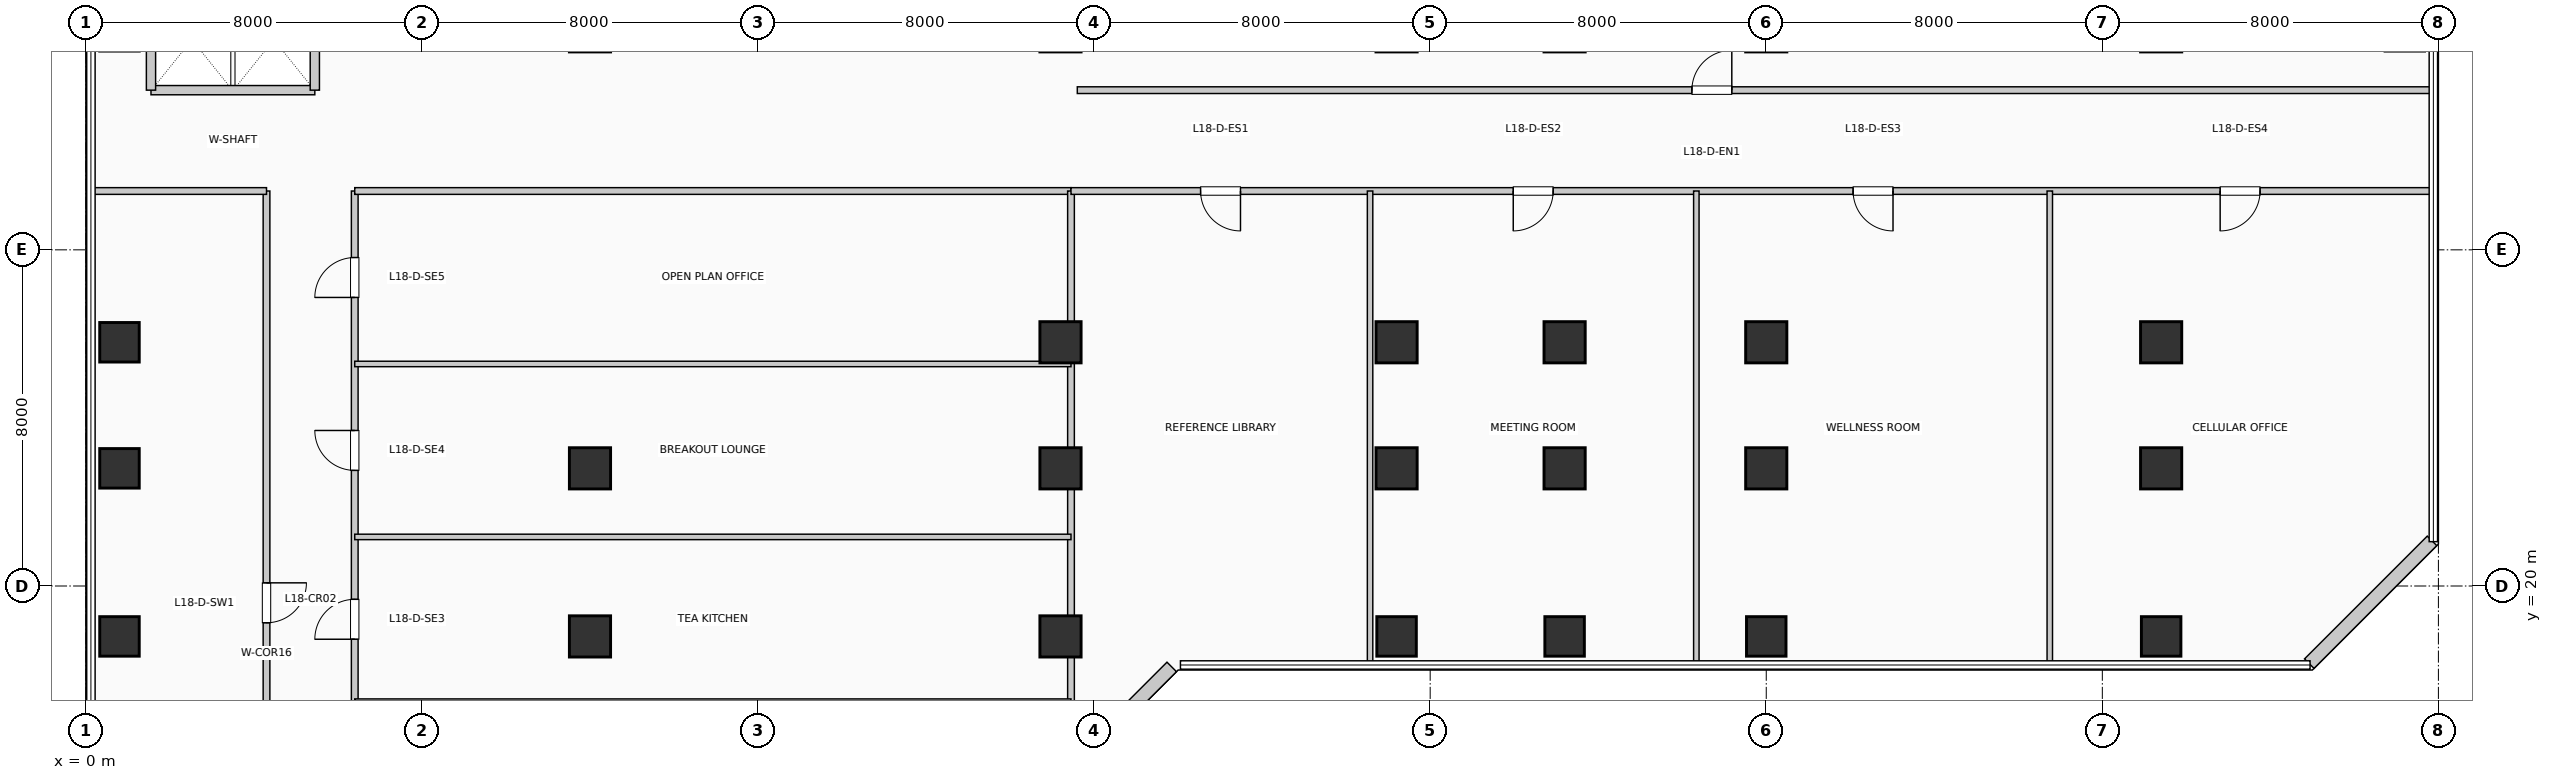
"""IFC4 building model, lengths in metres.
Left out: names, types, materials, properties, quantities, classifications, styles, units other than length and angle.
Written with IfcOpenShell. Run it as: python <this file> out.ifc"""

import sys

from ifc_helpers import new_model, si_unit, direction, frame, frame_2d, origin, origin_2d, place, context, subcontext, project, spatial, rectangle, extrude, element, fill, save


model = new_model("IFC4")
c1 = context("Model", 3, precision=1e-05, world=origin(), true_north=direction((0.0, 1.0)))
c2 = subcontext(c1, "Body", "Model", "MODEL_VIEW")
j1 = project(units=[si_unit("LENGTHUNIT", "METRE"), si_unit("PLANEANGLEUNIT", "RADIAN")], contexts=[c1])
p1 = place(None, origin())
s1 = spatial("IfcSite", under=j1, at=p1, CompositionType="ELEMENT")
p2 = place(p1, origin())
s2 = spatial("IfcBuilding", under=s1, at=p2, CompositionType="ELEMENT")
p3 = place(p2, frame((0.0, 0.0, 77.88)))
s3 = spatial("IfcBuildingStorey", under=s2, at=p3, CompositionType="ELEMENT", Elevation=77.88)
for number, where, z_axis, x_axis in (
    (1, (0.8, 18.8, 0.0), (0.0, 0.0, 1.0), (1.0, 0.0, 0.0)),
    (2, (0.8, 22.8, 0.0), (0.0, 0.0, 1.0), (1.0, 0.0, 0.0)),
    (3, (0.8, 25.8, 0.0), (0.0, 0.0, 1.0), (1.0, 0.0, 0.0)),
):
    element("IfcColumn", number, at=place(p3, frame(where, z_axis=z_axis, x_axis=x_axis)), inside=s3, PredefinedType="COLUMN", context=c2, shape_type="SweptSolid", body=[
        extrude(rectangle(XDim=0.94, YDim=0.94, at=origin_2d()), origin(), (0.0, 0.0, 1.0), 3.96),
    ])
for number, where, z_axis, x_axis in (
    (4, (12.0, 18.8, 0.0), (0.0, 0.0, 1.0), (1.0, 0.0, 0.0)),
    (5, (12.0, 22.8, 0.0), (0.0, 0.0, 1.0), (1.0, 0.0, 0.0)),
    (6, (23.2, 18.8, 0.0), (0.0, 0.0, 1.0), (1.0, 0.0, 0.0)),
    (7, (23.2, 22.8, 0.0), (0.0, 0.0, 1.0), (1.0, 0.0, 0.0)),
    (8, (23.2, 25.8, 0.0), (0.0, 0.0, 1.0), (1.0, 0.0, 0.0)),
):
    element("IfcColumn", number, at=place(p3, frame(where, z_axis=z_axis, x_axis=x_axis)), inside=s3, PredefinedType="COLUMN", context=c2, shape_type="SweptSolid", body=[
        extrude(rectangle(XDim=0.98, YDim=0.98, at=origin_2d()), origin(), (0.0, 0.0, 1.0), 3.96),
    ])
p4 = place(p3, frame((31.2, 18.8, 0.0), z_axis=(0.0, 0.0, 1.0), x_axis=(1.0, 0.0, 0.0)))
e9 = element("IfcColumn", 9, at=p4, inside=s3, PredefinedType="COLUMN", context=c2, shape_type="SweptSolid", body=[
    extrude(rectangle(XDim=0.94, YDim=0.94, at=origin_2d()), origin(), (0.0, 0.0, 1.0), 3.96),
])
for number, where, z_axis, x_axis in (
    (10, (31.2, 22.8, 0.0), (0.0, 0.0, 1.0), (1.0, 0.0, 0.0)),
    (11, (31.2, 25.8, 0.0), (0.0, 0.0, 1.0), (1.0, 0.0, 0.0)),
):
    element("IfcColumn", number, at=place(p3, frame(where, z_axis=z_axis, x_axis=x_axis)), inside=s3, PredefinedType="COLUMN", context=c2, shape_type="SweptSolid", body=[
        extrude(rectangle(XDim=0.98, YDim=0.98, at=origin_2d()), origin(), (0.0, 0.0, 1.0), 3.96),
    ])
p5 = place(p3, frame((35.2, 18.8, 0.0), z_axis=(0.0, 0.0, 1.0), x_axis=(1.0, 0.0, 0.0)))
e12 = element("IfcColumn", 12, at=p5, inside=s3, PredefinedType="COLUMN", context=c2, shape_type="SweptSolid", body=[
    extrude(rectangle(XDim=0.94, YDim=0.94, at=origin_2d()), origin(), (0.0, 0.0, 1.0), 3.96),
])
for number, where, z_axis, x_axis in (
    (13, (35.2, 22.8, 0.0), (0.0, 0.0, 1.0), (1.0, 0.0, 0.0)),
    (14, (35.2, 25.8, 0.0), (0.0, 0.0, 1.0), (1.0, 0.0, 0.0)),
):
    element("IfcColumn", number, at=place(p3, frame(where, z_axis=z_axis, x_axis=x_axis)), inside=s3, PredefinedType="COLUMN", context=c2, shape_type="SweptSolid", body=[
        extrude(rectangle(XDim=0.98, YDim=0.98, at=origin_2d()), origin(), (0.0, 0.0, 1.0), 3.96),
    ])
p6 = place(p3, frame((40.0, 18.8, 0.0), z_axis=(0.0, 0.0, 1.0), x_axis=(1.0, 0.0, 0.0)))
e15 = element("IfcColumn", 15, at=p6, inside=s3, PredefinedType="COLUMN", context=c2, shape_type="SweptSolid", body=[
    extrude(rectangle(XDim=0.94, YDim=0.94, at=origin_2d()), origin(), (0.0, 0.0, 1.0), 3.96),
])
for number, where, z_axis, x_axis in (
    (16, (40.0, 22.8, 0.0), (0.0, 0.0, 1.0), (1.0, 0.0, 0.0)),
    (17, (40.0, 25.8, 0.0), (0.0, 0.0, 1.0), (1.0, 0.0, 0.0)),
):
    element("IfcColumn", number, at=place(p3, frame(where, z_axis=z_axis, x_axis=x_axis)), inside=s3, PredefinedType="COLUMN", context=c2, shape_type="SweptSolid", body=[
        extrude(rectangle(XDim=0.98, YDim=0.98, at=origin_2d()), origin(), (0.0, 0.0, 1.0), 3.96),
    ])
p7 = place(p3, frame((49.4, 18.8, 0.0), z_axis=(0.0, 0.0, 1.0), x_axis=(1.0, 0.0, 0.0)))
e18 = element("IfcColumn", 18, at=p7, inside=s3, PredefinedType="COLUMN", context=c2, shape_type="SweptSolid", body=[
    extrude(rectangle(XDim=0.94, YDim=0.94, at=origin_2d()), origin(), (0.0, 0.0, 1.0), 3.96),
])
for number, where, z_axis, x_axis in (
    (19, (49.4, 22.8, 0.0), (0.0, 0.0, 1.0), (1.0, 0.0, 0.0)),
    (20, (49.4, 25.8, 0.0), (0.0, 0.0, 1.0), (1.0, 0.0, 0.0)),
):
    element("IfcColumn", number, at=place(p3, frame(where, z_axis=z_axis, x_axis=x_axis)), inside=s3, PredefinedType="COLUMN", context=c2, shape_type="SweptSolid", body=[
        extrude(rectangle(XDim=0.98, YDim=0.98, at=origin_2d()), origin(), (0.0, 0.0, 1.0), 3.96),
    ])
p8 = place(p3, frame((23.926, 16.152, 0.0), z_axis=(0.0, 0.0, 1.0), x_axis=(0.707106781187, 0.707106781187, 0.0)))
e21 = element("IfcWall", 21, at=p8, inside=s3, PredefinedType="SOLIDWALL", context=c2, shape_type="SweptSolid", body=[
    extrude(rectangle(XDim=2.718, YDim=0.32, at=frame_2d((1.359, 0.0))), origin(), (0.0, 0.0, 1.0), 3.71),
])
p9 = place(p3, frame((52.926, 18.152, 0.0), z_axis=(0.0, 0.0, 1.0), x_axis=(0.707106781187, 0.707106781187, 0.0)))
e22 = element("IfcWall", 22, at=p9, inside=s3, PredefinedType="SOLIDWALL", context=c2, shape_type="SweptSolid", body=[
    extrude(rectangle(XDim=4.133, YDim=0.32, at=frame_2d((2.066, 0.0))), origin(), (0.0, 0.0, 1.0), 3.71),
])
p10 = place(p3, frame((1.55, 31.8, 0.0), z_axis=(0.0, 0.0, 1.0), x_axis=(1.0, 0.0, 0.0)))
e23 = element("IfcWall", 23, at=p10, inside=s3, PredefinedType="PARTITIONING", context=c2, shape_type="SweptSolid", body=[
    extrude(rectangle(XDim=3.9, YDim=0.22, at=frame_2d((1.95, 0.0))), origin(), (0.0, 0.0, 1.0), 3.71),
])
for number, where, z_axis, x_axis in (
    (24, (1.55, 31.8, 0.0), (0.0, 0.0, 1.0), (0.0, 1.0, 0.0)),
    (25, (5.45, 31.8, 0.0), (0.0, 0.0, 1.0), (0.0, 1.0, 0.0)),
):
    element("IfcWall", number, at=place(p3, frame(where, z_axis=z_axis, x_axis=x_axis)), inside=s3, PredefinedType="PARTITIONING", context=c2, shape_type="SweptSolid", body=[
        extrude(rectangle(XDim=2.38, YDim=0.22, at=frame_2d((1.19, 0.0))), origin(), (0.0, 0.0, 1.0), 3.71),
    ])
p11 = place(p3, frame((4.3, 9.8, 0.0), z_axis=(0.0, 0.0, 1.0), x_axis=(0.0, 1.0, 0.0)))
e26 = element("IfcWall", 26, at=p11, inside=s3, PredefinedType="PARTITIONING", context=c2, shape_type="SweptSolid", body=[
    extrude(rectangle(XDim=19.6, YDim=0.16, at=frame_2d((9.8, 0.0))), origin(), (0.0, 0.0, 1.0), 3.71),
])
p12 = place(p11, frame((10.275, 0.0, 0.0), z_axis=(0.0, 0.0, 1.0), x_axis=(-1.0, 0.0, 0.0)))
e27 = element("IfcOpeningElement", 27, at=p12, cuts=e26, PredefinedType="OPENING", context=c2, shape_type="SweptSolid", body=[
    extrude(rectangle(XDim=0.95, YDim=2.15, at=frame_2d((0.475, 1.075))), frame((0.0, 0.09, 0.0), z_axis=(0.0, -1.0, 0.0), x_axis=(1.0, 0.0, 0.0)), (0.0, 0.0, 1.0), 0.18),
])
p13 = place(p3, frame((6.4, 9.8, 0.0), z_axis=(0.0, 0.0, 1.0), x_axis=(0.0, 1.0, 0.0)))
e28 = element("IfcWall", 28, at=p13, inside=s3, PredefinedType="PARTITIONING", context=c2, shape_type="SweptSolid", body=[
    extrude(rectangle(XDim=19.6, YDim=0.16, at=frame_2d((9.8, 0.0))), origin(), (0.0, 0.0, 1.0), 3.71),
])
p14 = place(p13, frame((1.387, 0.0, 0.0)))
e29 = element("IfcOpeningElement", 29, at=p14, cuts=e28, PredefinedType="OPENING", context=c2, shape_type="SweptSolid", body=[
    extrude(rectangle(XDim=0.95, YDim=2.15, at=frame_2d((0.475, 1.075))), frame((0.0, 0.09, 0.0), z_axis=(0.0, -1.0, 0.0), x_axis=(1.0, 0.0, 0.0)), (0.0, 0.0, 1.0), 0.18),
])
p15 = place(p13, frame((5.111, 0.0, 0.0)))
e30 = element("IfcOpeningElement", 30, at=p15, cuts=e28, PredefinedType="OPENING", context=c2, shape_type="SweptSolid", body=[
    extrude(rectangle(XDim=0.95, YDim=2.15, at=frame_2d((0.475, 1.075))), frame((0.0, 0.09, 0.0), z_axis=(0.0, -1.0, 0.0), x_axis=(1.0, 0.0, 0.0)), (0.0, 0.0, 1.0), 0.18),
])
p16 = place(p13, frame((8.933, 0.0, 0.0)))
e31 = element("IfcOpeningElement", 31, at=p16, cuts=e28, PredefinedType="OPENING", context=c2, shape_type="SweptSolid", body=[
    extrude(rectangle(XDim=0.95, YDim=2.15, at=frame_2d((0.475, 1.075))), frame((0.0, 0.09, 0.0), z_axis=(0.0, -1.0, 0.0), x_axis=(1.0, 0.0, 0.0)), (0.0, 0.0, 1.0), 0.18),
])
p17 = place(p13, frame((12.951, 0.0, 0.0)))
e32 = element("IfcOpeningElement", 32, at=p17, cuts=e28, PredefinedType="OPENING", context=c2, shape_type="SweptSolid", body=[
    extrude(rectangle(XDim=0.95, YDim=2.15, at=frame_2d((0.475, 1.075))), frame((0.0, 0.09, 0.0), z_axis=(0.0, -1.0, 0.0), x_axis=(1.0, 0.0, 0.0)), (0.0, 0.0, 1.0), 0.18),
])
p18 = place(p13, frame((17.067, 0.0, 0.0)))
e33 = element("IfcOpeningElement", 33, at=p18, cuts=e28, PredefinedType="OPENING", context=c2, shape_type="SweptSolid", body=[
    extrude(rectangle(XDim=0.95, YDim=2.15, at=frame_2d((0.475, 1.075))), frame((0.0, 0.09, 0.0), z_axis=(0.0, -1.0, 0.0), x_axis=(1.0, 0.0, 0.0)), (0.0, 0.0, 1.0), 0.18),
])
p19 = place(p3, frame((0.19, 29.4, 0.0), z_axis=(0.0, 0.0, 1.0), x_axis=(1.0, 0.0, 0.0)))
e34 = element("IfcWall", 34, at=p19, inside=s3, PredefinedType="PARTITIONING", context=c2, shape_type="SweptSolid", body=[
    extrude(rectangle(XDim=4.11, YDim=0.16, at=frame_2d((2.055, 0.0))), origin(), (0.0, 0.0, 1.0), 3.365),
])
p20 = place(p3, frame((6.4, 29.4, 0.0), z_axis=(0.0, 0.0, 1.0), x_axis=(1.0, 0.0, 0.0)))
e35 = element("IfcWall", 35, at=p20, inside=s3, PredefinedType="PARTITIONING", context=c2, shape_type="SweptSolid", body=[
    extrude(rectangle(XDim=17.05, YDim=0.16, at=frame_2d((8.525, 0.0))), origin(), (0.0, 0.0, 1.0), 3.365),
])
p21 = place(p3, frame((23.45, 1.04, 0.0), z_axis=(0.0, 0.0, 1.0), x_axis=(0.0, 1.0, 0.0)))
e36 = element("IfcWall", 36, at=p21, inside=s3, PredefinedType="PARTITIONING", context=c2, shape_type="SweptSolid", body=[
    extrude(rectangle(XDim=28.36, YDim=0.16, at=frame_2d((14.18, 0.0))), origin(), (0.0, 0.0, 1.0), 2.995),
])
for number, where, z_axis, x_axis in (
    (37, (6.4, 17.248, 0.0), (0.0, 0.0, 1.0), (1.0, 0.0, 0.0)),
    (38, (6.4, 21.168, 0.0), (0.0, 0.0, 1.0), (1.0, 0.0, 0.0)),
    (39, (6.4, 25.284, 0.0), (0.0, 0.0, 1.0), (1.0, 0.0, 0.0)),
):
    element("IfcWall", number, at=place(p3, frame(where, z_axis=z_axis, x_axis=x_axis)), inside=s3, PredefinedType="PARTITIONING", context=c2, shape_type="SweptSolid", body=[
        extrude(rectangle(XDim=17.05, YDim=0.13, at=frame_2d((8.525, 0.0))), origin(), (0.0, 0.0, 1.0), 3.71),
    ])
p22 = place(p3, frame((23.45, 29.4, 0.0), z_axis=(0.0, 0.0, 1.0), x_axis=(1.0, 0.0, 0.0)))
e40 = element("IfcWall", 40, at=p22, inside=s3, PredefinedType="PARTITIONING", context=c2, shape_type="SweptSolid", body=[
    extrude(rectangle(XDim=32.36, YDim=0.16, at=frame_2d((16.18, 0.0))), origin(), (0.0, 0.0, 1.0), 3.365),
])
p23 = place(p22, frame((4.035, 0.0, 0.0), z_axis=(0.0, 0.0, 1.0), x_axis=(-1.0, 0.0, 0.0)))
e41 = element("IfcOpeningElement", 41, at=p23, cuts=e40, PredefinedType="OPENING", context=c2, shape_type="SweptSolid", body=[
    extrude(rectangle(XDim=0.95, YDim=2.15, at=frame_2d((0.475, 1.075))), frame((0.0, 0.09, 0.0), z_axis=(0.0, -1.0, 0.0), x_axis=(1.0, 0.0, 0.0)), (0.0, 0.0, 1.0), 0.18),
])
p24 = place(p22, frame((11.477, 0.0, 0.0), z_axis=(0.0, 0.0, 1.0), x_axis=(-1.0, 0.0, 0.0)))
e42 = element("IfcOpeningElement", 42, at=p24, cuts=e40, PredefinedType="OPENING", context=c2, shape_type="SweptSolid", body=[
    extrude(rectangle(XDim=0.95, YDim=2.15, at=frame_2d((0.475, 1.075))), frame((0.0, 0.09, 0.0), z_axis=(0.0, -1.0, 0.0), x_axis=(1.0, 0.0, 0.0)), (0.0, 0.0, 1.0), 0.18),
])
p25 = place(p22, frame((19.567, 0.0, 0.0), z_axis=(0.0, 0.0, 1.0), x_axis=(-1.0, 0.0, 0.0)))
e43 = element("IfcOpeningElement", 43, at=p25, cuts=e40, PredefinedType="OPENING", context=c2, shape_type="SweptSolid", body=[
    extrude(rectangle(XDim=0.95, YDim=2.15, at=frame_2d((0.475, 1.075))), frame((0.0, 0.09, 0.0), z_axis=(0.0, -1.0, 0.0), x_axis=(1.0, 0.0, 0.0)), (0.0, 0.0, 1.0), 0.18),
])
p26 = place(p22, frame((28.304, 0.0, 0.0), z_axis=(0.0, 0.0, 1.0), x_axis=(-1.0, 0.0, 0.0)))
e44 = element("IfcOpeningElement", 44, at=p26, cuts=e40, PredefinedType="OPENING", context=c2, shape_type="SweptSolid", body=[
    extrude(rectangle(XDim=0.95, YDim=2.15, at=frame_2d((0.475, 1.075))), frame((0.0, 0.09, 0.0), z_axis=(0.0, -1.0, 0.0), x_axis=(1.0, 0.0, 0.0)), (0.0, 0.0, 1.0), 0.18),
])
p27 = place(p3, frame((23.6, 31.8, 0.0), z_axis=(0.0, 0.0, 1.0), x_axis=(1.0, 0.0, 0.0)))
e45 = element("IfcWall", 45, at=p27, inside=s3, PredefinedType="PARTITIONING", context=c2, shape_type="SweptSolid", body=[
    extrude(rectangle(XDim=32.21, YDim=0.16, at=frame_2d((16.105, 0.0))), origin(), (0.0, 0.0, 1.0), 3.71),
])
p28 = place(p27, frame((14.63, 0.0, 0.0)))
e46 = element("IfcOpeningElement", 46, at=p28, cuts=e45, PredefinedType="OPENING", context=c2, shape_type="SweptSolid", body=[
    extrude(rectangle(XDim=0.95, YDim=2.15, at=frame_2d((0.475, 1.075))), frame((0.0, 0.09, 0.0), z_axis=(0.0, -1.0, 0.0), x_axis=(1.0, 0.0, 0.0)), (0.0, 0.0, 1.0), 0.18),
])
for number, where, z_axis, x_axis in (
    (47, (30.569, 18.19, 0.0), (0.0, 0.0, 1.0), (0.0, 1.0, 0.0)),
    (48, (38.336, 18.19, 0.0), (0.0, 0.0, 1.0), (0.0, 1.0, 0.0)),
    (49, (46.749, 18.19, 0.0), (0.0, 0.0, 1.0), (0.0, 1.0, 0.0)),
):
    element("IfcWall", number, at=place(p3, frame(where, z_axis=z_axis, x_axis=x_axis)), inside=s3, PredefinedType="PARTITIONING", context=c2, shape_type="SweptSolid", body=[
        extrude(rectangle(XDim=11.21, YDim=0.13, at=frame_2d((5.605, 0.0))), origin(), (0.0, 0.0, 1.0), 3.71),
    ])
p29 = place(p12, origin())
e50 = element("IfcDoor", 50, at=p29, inside=s3, OperationType="SINGLE_SWING_RIGHT", PredefinedType="DOOR", context=c2, shape_type="SweptSolid", body=[
    extrude(rectangle(XDim=0.95, YDim=2.15, at=frame_2d((0.475, 1.075))), frame((0.0, 0.025, 0.0), z_axis=(0.0, -1.0, 0.0), x_axis=(1.0, 0.0, 0.0)), (0.0, 0.0, 1.0), 0.05),
])
fill(e27, e50)
p30 = place(p16, origin())
e51 = element("IfcDoor", 51, at=p30, inside=s3, OperationType="SINGLE_SWING_LEFT", PredefinedType="DOOR", context=c2, shape_type="SweptSolid", body=[
    extrude(rectangle(XDim=0.95, YDim=2.15, at=frame_2d((0.475, 1.075))), frame((0.0, 0.025, 0.0), z_axis=(0.0, -1.0, 0.0), x_axis=(1.0, 0.0, 0.0)), (0.0, 0.0, 1.0), 0.05),
])
fill(e31, e51)
p31 = place(p17, origin())
e52 = element("IfcDoor", 52, at=p31, inside=s3, OperationType="SINGLE_SWING_RIGHT", PredefinedType="DOOR", context=c2, shape_type="SweptSolid", body=[
    extrude(rectangle(XDim=0.95, YDim=2.15, at=frame_2d((0.475, 1.075))), frame((0.0, 0.025, 0.0), z_axis=(0.0, -1.0, 0.0), x_axis=(1.0, 0.0, 0.0)), (0.0, 0.0, 1.0), 0.05),
])
fill(e32, e52)
p32 = place(p18, origin())
e53 = element("IfcDoor", 53, at=p32, inside=s3, OperationType="SINGLE_SWING_LEFT", PredefinedType="DOOR", context=c2, shape_type="SweptSolid", body=[
    extrude(rectangle(XDim=0.95, YDim=2.15, at=frame_2d((0.475, 1.075))), frame((0.0, 0.025, 0.0), z_axis=(0.0, -1.0, 0.0), x_axis=(1.0, 0.0, 0.0)), (0.0, 0.0, 1.0), 0.05),
])
fill(e33, e53)
p33 = place(p23, origin())
e54 = element("IfcDoor", 54, at=p33, inside=s3, OperationType="SINGLE_SWING_RIGHT", PredefinedType="DOOR", context=c2, shape_type="SweptSolid", body=[
    extrude(rectangle(XDim=0.95, YDim=2.15, at=frame_2d((0.475, 1.075))), frame((0.0, 0.025, 0.0), z_axis=(0.0, -1.0, 0.0), x_axis=(1.0, 0.0, 0.0)), (0.0, 0.0, 1.0), 0.05),
])
fill(e41, e54)
p34 = place(p24, origin())
e55 = element("IfcDoor", 55, at=p34, inside=s3, OperationType="SINGLE_SWING_LEFT", PredefinedType="DOOR", context=c2, shape_type="SweptSolid", body=[
    extrude(rectangle(XDim=0.95, YDim=2.15, at=frame_2d((0.475, 1.075))), frame((0.0, 0.025, 0.0), z_axis=(0.0, -1.0, 0.0), x_axis=(1.0, 0.0, 0.0)), (0.0, 0.0, 1.0), 0.05),
])
fill(e42, e55)
p35 = place(p25, origin())
e56 = element("IfcDoor", 56, at=p35, inside=s3, OperationType="SINGLE_SWING_RIGHT", PredefinedType="DOOR", context=c2, shape_type="SweptSolid", body=[
    extrude(rectangle(XDim=0.95, YDim=2.15, at=frame_2d((0.475, 1.075))), frame((0.0, 0.025, 0.0), z_axis=(0.0, -1.0, 0.0), x_axis=(1.0, 0.0, 0.0)), (0.0, 0.0, 1.0), 0.05),
])
fill(e43, e56)
p36 = place(p26, origin())
e57 = element("IfcDoor", 57, at=p36, inside=s3, OperationType="SINGLE_SWING_LEFT", PredefinedType="DOOR", context=c2, shape_type="SweptSolid", body=[
    extrude(rectangle(XDim=0.95, YDim=2.15, at=frame_2d((0.475, 1.075))), frame((0.0, 0.025, 0.0), z_axis=(0.0, -1.0, 0.0), x_axis=(1.0, 0.0, 0.0)), (0.0, 0.0, 1.0), 0.05),
])
fill(e44, e57)
p37 = place(p28, origin())
e58 = element("IfcDoor", 58, at=p37, inside=s3, OperationType="SINGLE_SWING_RIGHT", PredefinedType="DOOR", context=c2, shape_type="SweptSolid", body=[
    extrude(rectangle(XDim=0.95, YDim=2.15, at=frame_2d((0.475, 1.075))), frame((0.0, 0.025, 0.0), z_axis=(0.0, -1.0, 0.0), x_axis=(1.0, 0.0, 0.0)), (0.0, 0.0, 1.0), 0.05),
])
fill(e46, e58)
save(model, sys.argv[1])
